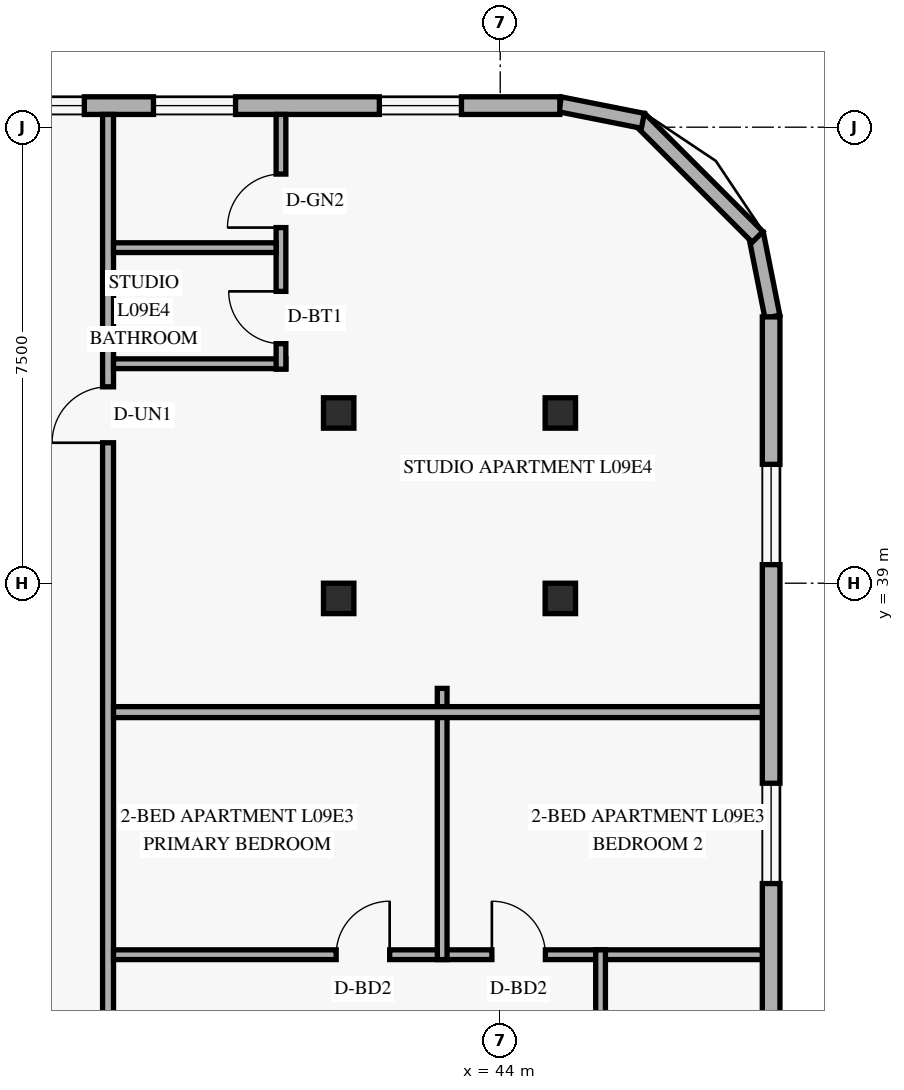
"""IFC4 building model, lengths in metres.
Left out: names, types, materials, properties, quantities, classifications, styles, units other than length and angle.
Written with IfcOpenShell. Run it as: python <this file> out.ifc"""

import sys

from ifc_helpers import new_model, si_unit, direction, frame, frame_2d, origin, origin_2d, place, context, subcontext, project, spatial, rectangle, hollow_rectangle, extrude, element, fill, save


model = new_model("IFC4")
c1 = context("Model", 3, precision=1e-05, world=origin(), true_north=direction((0.0, 1.0)))
c2 = subcontext(c1, "Body", "Model", "MODEL_VIEW")
j1 = project(units=[si_unit("LENGTHUNIT", "METRE"), si_unit("PLANEANGLEUNIT", "RADIAN")], contexts=[c1])
p1 = place(None, origin())
s1 = spatial("IfcSite", under=j1, at=p1, CompositionType="ELEMENT")
p2 = place(p1, origin())
s2 = spatial("IfcBuilding", under=s1, at=p2, CompositionType="ELEMENT")
p3 = place(p2, frame((0.0, 0.0, 38.4)))
s3 = spatial("IfcBuildingStorey", under=s2, at=p3, CompositionType="ELEMENT", Elevation=38.4)
for number, where, z_axis, x_axis in (
    (1, (41.28, 38.75, 0.0), (0.035, 0.0, 0.999), (0.0, 1.0, 0.0)),
    (2, (41.28, 41.8, 0.0), (0.035, 0.0, 0.999), (0.0, 1.0, 0.0)),
):
    element("IfcColumn", number, at=place(p3, frame(where, z_axis=z_axis, x_axis=x_axis)), inside=s3, PredefinedType="COLUMN", context=c2, shape_type="SweptSolid", body=[
        extrude(hollow_rectangle(XDim=0.5, YDim=0.5, WallThickness=0.022, at=origin_2d()), origin(), (0.0, 0.0, 1.0), 3.602),
    ])
for number, where, z_axis, x_axis in (
    (3, (44.884, 38.75, 0.0), (0.058, 0.0, 0.998), (0.0, 1.0, 0.0)),
    (4, (44.884, 41.8, 0.0), (0.058, 0.0, 0.998), (0.0, 1.0, 0.0)),
):
    element("IfcColumn", number, at=place(p3, frame(where, z_axis=z_axis, x_axis=x_axis)), inside=s3, PredefinedType="COLUMN", context=c2, shape_type="SweptSolid", body=[
        extrude(hollow_rectangle(XDim=0.5, YDim=0.5, WallThickness=0.022, at=origin_2d()), origin(), (0.0, 0.0, 1.0), 3.606),
    ])
p4 = place(p3, frame((48.476, 43.384, 0.0), z_axis=(0.0, 0.0, 1.0), x_axis=(-0.19496651342, 0.980809899341, 0.0)))
e5 = element("IfcWall", 5, at=p4, inside=s3, PredefinedType="SOLIDWALL", context=c2, shape_type="SweptSolid", body=[
    extrude(rectangle(XDim=1.389, YDim=0.25, at=frame_2d((0.694, 0.0))), origin(), (0.0, 0.0, 1.0), 3.36),
])
p5 = place(p3, frame((48.232, 44.695, 0.0), z_axis=(0.0, 0.0, 1.0), x_axis=(-0.707106781187, 0.707106781187, 0.0)))
e6 = element("IfcWall", 6, at=p5, inside=s3, PredefinedType="SOLIDWALL", context=c2, shape_type="SweptSolid", body=[
    extrude(rectangle(XDim=2.739, YDim=0.25, at=frame_2d((1.37, 0.0))), origin(), (0.0, 0.0, 1.0), 3.36),
])
p6 = place(p3, frame((46.345, 46.605, 0.0), z_axis=(0.0, 0.0, 1.0), x_axis=(-0.980809899341, 0.19496651342, 0.0)))
e7 = element("IfcWall", 7, at=p6, inside=s3, PredefinedType="SOLIDWALL", context=c2, shape_type="SweptSolid", body=[
    extrude(rectangle(XDim=1.389, YDim=0.25, at=frame_2d((0.694, 0.0))), origin(), (0.0, 0.0, 1.0), 3.36),
])
p7 = place(p3, frame((48.455, 4.62, 0.0), z_axis=(0.0, 0.0, 1.0), x_axis=(0.0, 1.0, 0.0)))
e8 = element("IfcWall", 8, at=p7, inside=s3, PredefinedType="SOLIDWALL", context=c2, shape_type="SweptSolid", body=[
    extrude(rectangle(XDim=38.76, YDim=0.29, at=frame_2d((19.38, 0.0))), origin(), (0.0, 0.0, 1.0), 3.36),
])
p8 = place(p7, frame((2.885, 0.0, 0.85)))
e9 = element("IfcOpeningElement", 9, at=p8, cuts=e8, PredefinedType="OPENING", context=c2, shape_type="SweptSolid", body=[
    extrude(rectangle(XDim=1.65, YDim=1.6, at=frame_2d((0.825, 0.8))), frame((0.0, 0.155, 0.0), z_axis=(0.0, -1.0, 0.0), x_axis=(1.0, 0.0, 0.0)), (0.0, 0.0, 1.0), 0.31),
])
p9 = place(p7, frame((11.215, 0.0, 0.85)))
e10 = element("IfcOpeningElement", 10, at=p9, cuts=e8, PredefinedType="OPENING", context=c2, shape_type="SweptSolid", body=[
    extrude(rectangle(XDim=1.65, YDim=1.6, at=frame_2d((0.825, 0.8))), frame((0.0, 0.155, 0.0), z_axis=(0.0, -1.0, 0.0), x_axis=(1.0, 0.0, 0.0)), (0.0, 0.0, 1.0), 0.31),
])
p10 = place(p7, frame((17.655, 0.0, 0.85)))
e11 = element("IfcOpeningElement", 11, at=p10, cuts=e8, PredefinedType="OPENING", context=c2, shape_type="SweptSolid", body=[
    extrude(rectangle(XDim=1.65, YDim=1.6, at=frame_2d((0.825, 0.8))), frame((0.0, 0.155, 0.0), z_axis=(0.0, -1.0, 0.0), x_axis=(1.0, 0.0, 0.0)), (0.0, 0.0, 1.0), 0.31),
])
p11 = place(p7, frame((23.46, 0.0, 0.85)))
e12 = element("IfcOpeningElement", 12, at=p11, cuts=e8, PredefinedType="OPENING", context=c2, shape_type="SweptSolid", body=[
    extrude(rectangle(XDim=1.65, YDim=1.6, at=frame_2d((0.825, 0.8))), frame((0.0, 0.155, 0.0), z_axis=(0.0, -1.0, 0.0), x_axis=(1.0, 0.0, 0.0)), (0.0, 0.0, 1.0), 0.31),
])
p12 = place(p7, frame((29.44, 0.0, 0.85)))
e13 = element("IfcOpeningElement", 13, at=p12, cuts=e8, PredefinedType="OPENING", context=c2, shape_type="SweptSolid", body=[
    extrude(rectangle(XDim=1.65, YDim=1.6, at=frame_2d((0.825, 0.8))), frame((0.0, 0.155, 0.0), z_axis=(0.0, -1.0, 0.0), x_axis=(1.0, 0.0, 0.0)), (0.0, 0.0, 1.0), 0.31),
])
p13 = place(p7, frame((34.685, 0.0, 0.85)))
e14 = element("IfcOpeningElement", 14, at=p13, cuts=e8, PredefinedType="OPENING", context=c2, shape_type="SweptSolid", body=[
    extrude(rectangle(XDim=1.65, YDim=1.6, at=frame_2d((0.825, 0.8))), frame((0.0, 0.155, 0.0), z_axis=(0.0, -1.0, 0.0), x_axis=(1.0, 0.0, 0.0)), (0.0, 0.0, 1.0), 0.31),
])
p14 = place(p3, frame((44.98, 46.855, 0.0), z_axis=(0.0, 0.0, 1.0), x_axis=(-1.0, 0.0, 0.0)))
e15 = element("IfcWall", 15, at=p14, inside=s3, PredefinedType="SOLIDWALL", context=c2, shape_type="SweptSolid", body=[
    extrude(rectangle(XDim=39.56, YDim=0.29, at=frame_2d((19.78, 0.0))), origin(), (0.0, 0.0, 1.0), 3.36),
])
p15 = place(p14, frame((35.445, 0.0, 0.85)))
e16 = element("IfcOpeningElement", 16, at=p15, cuts=e15, PredefinedType="OPENING", context=c2, shape_type="SweptSolid", body=[
    extrude(rectangle(XDim=1.35, YDim=1.55, at=frame_2d((0.675, 0.775))), frame((0.0, 0.155, 0.0), z_axis=(0.0, -1.0, 0.0), x_axis=(1.0, 0.0, 0.0)), (0.0, 0.0, 1.0), 0.31),
])
p16 = place(p14, frame((31.18, 0.0, 0.85)))
e17 = element("IfcOpeningElement", 17, at=p16, cuts=e15, PredefinedType="OPENING", context=c2, shape_type="SweptSolid", body=[
    extrude(rectangle(XDim=1.2, YDim=1.5, at=frame_2d((0.6, 0.75))), frame((0.0, 0.155, 0.0), z_axis=(0.0, -1.0, 0.0), x_axis=(1.0, 0.0, 0.0)), (0.0, 0.0, 1.0), 0.31),
])
p17 = place(p14, frame((25.834, 0.0, 0.85)))
e18 = element("IfcOpeningElement", 18, at=p17, cuts=e15, PredefinedType="OPENING", context=c2, shape_type="SweptSolid", body=[
    extrude(rectangle(XDim=1.35, YDim=1.55, at=frame_2d((0.675, 0.775))), frame((0.0, 0.155, 0.0), z_axis=(0.0, -1.0, 0.0), x_axis=(1.0, 0.0, 0.0)), (0.0, 0.0, 1.0), 0.31),
])
p18 = place(p14, frame((18.799, 0.0, 0.85)))
e19 = element("IfcOpeningElement", 19, at=p18, cuts=e15, PredefinedType="OPENING", context=c2, shape_type="SweptSolid", body=[
    extrude(rectangle(XDim=1.35, YDim=1.55, at=frame_2d((0.675, 0.775))), frame((0.0, 0.155, 0.0), z_axis=(0.0, -1.0, 0.0), x_axis=(1.0, 0.0, 0.0)), (0.0, 0.0, 1.0), 0.31),
])
p19 = place(p14, frame((12.51, 0.0, 0.85)))
e20 = element("IfcOpeningElement", 20, at=p19, cuts=e15, PredefinedType="OPENING", context=c2, shape_type="SweptSolid", body=[
    extrude(rectangle(XDim=1.35, YDim=1.55, at=frame_2d((0.675, 0.775))), frame((0.0, 0.155, 0.0), z_axis=(0.0, -1.0, 0.0), x_axis=(1.0, 0.0, 0.0)), (0.0, 0.0, 1.0), 0.31),
])
p20 = place(p14, frame((7.82, 0.0, 0.85)))
e21 = element("IfcOpeningElement", 21, at=p20, cuts=e15, PredefinedType="OPENING", context=c2, shape_type="SweptSolid", body=[
    extrude(rectangle(XDim=1.35, YDim=1.55, at=frame_2d((0.675, 0.775))), frame((0.0, 0.155, 0.0), z_axis=(0.0, -1.0, 0.0), x_axis=(1.0, 0.0, 0.0)), (0.0, 0.0, 1.0), 0.31),
])
p21 = place(p14, frame((5.333, 0.0, 0.85)))
e22 = element("IfcOpeningElement", 22, at=p21, cuts=e15, PredefinedType="OPENING", context=c2, shape_type="SweptSolid", body=[
    extrude(rectangle(XDim=1.35, YDim=1.55, at=frame_2d((0.675, 0.775))), frame((0.0, 0.155, 0.0), z_axis=(0.0, -1.0, 0.0), x_axis=(1.0, 0.0, 0.0)), (0.0, 0.0, 1.0), 0.31),
])
p22 = place(p14, frame((1.618, 0.0, 0.85)))
e23 = element("IfcOpeningElement", 23, at=p22, cuts=e15, PredefinedType="OPENING", context=c2, shape_type="SweptSolid", body=[
    extrude(rectangle(XDim=1.35, YDim=1.55, at=frame_2d((0.675, 0.775))), frame((0.0, 0.155, 0.0), z_axis=(0.0, -1.0, 0.0), x_axis=(1.0, 0.0, 0.0)), (0.0, 0.0, 1.0), 0.31),
])
p23 = place(p3, frame((37.55, 1.29, 0.0), z_axis=(0.0, 0.0, 1.0), x_axis=(0.0, 1.0, 0.0)))
e24 = element("IfcWall", 24, at=p23, inside=s3, PredefinedType="STANDARD", context=c2, shape_type="SweptSolid", body=[
    extrude(rectangle(XDim=45.42, YDim=0.18, at=frame_2d((22.71, 0.0))), origin(), (0.0, 0.0, 1.0), 2.649),
])
p24 = place(p23, frame((4.46, 0.0, 0.0)))
e25 = element("IfcOpeningElement", 25, at=p24, cuts=e24, PredefinedType="OPENING", context=c2, shape_type="SweptSolid", body=[
    extrude(rectangle(XDim=0.92, YDim=2.15, at=frame_2d((0.46, 1.075))), frame((0.0, 0.1, 0.0), z_axis=(0.0, -1.0, 0.0), x_axis=(1.0, 0.0, 0.0)), (0.0, 0.0, 1.0), 0.2),
])
p25 = place(p23, frame((15.907, 0.0, 0.0)))
e26 = element("IfcOpeningElement", 26, at=p25, cuts=e24, PredefinedType="OPENING", context=c2, shape_type="SweptSolid", body=[
    extrude(rectangle(XDim=0.92, YDim=2.15, at=frame_2d((0.46, 1.075))), frame((0.0, 0.1, 0.0), z_axis=(0.0, -1.0, 0.0), x_axis=(1.0, 0.0, 0.0)), (0.0, 0.0, 1.0), 0.2),
])
p26 = place(p23, frame((28.23, 0.0, 0.0)))
e27 = element("IfcOpeningElement", 27, at=p26, cuts=e24, PredefinedType="OPENING", context=c2, shape_type="SweptSolid", body=[
    extrude(rectangle(XDim=0.92, YDim=2.15, at=frame_2d((0.46, 1.075))), frame((0.0, 0.1, 0.0), z_axis=(0.0, -1.0, 0.0), x_axis=(1.0, 0.0, 0.0)), (0.0, 0.0, 1.0), 0.2),
])
p27 = place(p23, frame((40.02, 0.0, 0.0)))
e28 = element("IfcOpeningElement", 28, at=p27, cuts=e24, PredefinedType="OPENING", context=c2, shape_type="SweptSolid", body=[
    extrude(rectangle(XDim=0.92, YDim=2.15, at=frame_2d((0.46, 1.075))), frame((0.0, 0.1, 0.0), z_axis=(0.0, -1.0, 0.0), x_axis=(1.0, 0.0, 0.0)), (0.0, 0.0, 1.0), 0.2),
])
p28 = place(p3, frame((37.64, 32.89, 0.0), z_axis=(0.0, 0.0, 1.0), x_axis=(1.0, 0.0, 0.0)))
e29 = element("IfcWall", 29, at=p28, inside=s3, PredefinedType="PARTITIONING", context=c2, shape_type="SweptSolid", body=[
    extrude(rectangle(XDim=10.67, YDim=0.16, at=frame_2d((5.335, 0.0))), origin(), (0.0, 0.0, 1.0), 2.649),
])
p29 = place(p28, frame((3.662, 0.0, 0.0)))
e30 = element("IfcOpeningElement", 30, at=p29, cuts=e29, PredefinedType="OPENING", context=c2, shape_type="SweptSolid", body=[
    extrude(rectangle(XDim=0.88, YDim=2.14, at=frame_2d((0.44, 1.07))), frame((0.0, 0.09, 0.0), z_axis=(0.0, -1.0, 0.0), x_axis=(1.0, 0.0, 0.0)), (0.0, 0.0, 1.0), 0.18),
])
p30 = place(p28, frame((6.222, 0.0, 0.0)))
e31 = element("IfcOpeningElement", 31, at=p30, cuts=e29, PredefinedType="OPENING", context=c2, shape_type="SweptSolid", body=[
    extrude(rectangle(XDim=0.88, YDim=2.14, at=frame_2d((0.44, 1.07))), frame((0.0, 0.09, 0.0), z_axis=(0.0, -1.0, 0.0), x_axis=(1.0, 0.0, 0.0)), (0.0, 0.0, 1.0), 0.18),
])
p31 = place(p3, frame((45.65, 24.56, 0.0), z_axis=(0.0, 0.0, 1.0), x_axis=(0.0, 1.0, 0.0)))
e32 = element("IfcWall", 32, at=p31, inside=s3, PredefinedType="PARTITIONING", context=c2, shape_type="SweptSolid", body=[
    extrude(rectangle(XDim=8.41, YDim=0.16, at=frame_2d((4.205, 0.0))), origin(), (0.0, 0.0, 1.0), 3.36),
])
p32 = place(p31, frame((3.445, 0.0, 0.0)))
e33 = element("IfcOpeningElement", 33, at=p32, cuts=e32, PredefinedType="OPENING", context=c2, shape_type="SweptSolid", body=[
    extrude(rectangle(XDim=0.95, YDim=2.15, at=frame_2d((0.475, 1.075))), frame((0.0, 0.09, 0.0), z_axis=(0.0, -1.0, 0.0), x_axis=(1.0, 0.0, 0.0)), (0.0, 0.0, 1.0), 0.18),
])
p33 = place(p3, frame((43.045, 32.81, 0.0), z_axis=(0.0, 0.0, 1.0), x_axis=(0.0, 1.0, 0.0)))
e34 = element("IfcWall", 34, at=p33, inside=s3, PredefinedType="PARTITIONING", context=c2, shape_type="SweptSolid", body=[
    extrude(rectangle(XDim=4.46, YDim=0.16, at=frame_2d((2.23, 0.0))), origin(), (0.0, 0.0, 1.0), 2.932),
])
p34 = place(p3, frame((37.64, 36.88, 0.0), z_axis=(0.0, 0.0, 1.0), x_axis=(1.0, 0.0, 0.0)))
e35 = element("IfcWall", 35, at=p34, inside=s3, PredefinedType="PARTITIONING", context=c2, shape_type="SweptSolid", body=[
    extrude(rectangle(XDim=10.67, YDim=0.18, at=frame_2d((5.335, 0.0))), origin(), (0.0, 0.0, 1.0), 2.649),
])
p35 = place(p3, frame((37.64, 42.61, 0.0), z_axis=(0.0, 0.0, 1.0), x_axis=(1.0, 0.0, 0.0)))
e36 = element("IfcWall", 36, at=p35, inside=s3, PredefinedType="PLUMBINGWALL", context=c2, shape_type="SweptSolid", body=[
    extrude(rectangle(XDim=2.834, YDim=0.16, at=frame_2d((1.417, 0.0))), origin(), (0.0, 0.0, 1.0), 3.36),
])
p36 = place(p3, frame((40.394, 42.52, 0.0), z_axis=(0.0, 0.0, 1.0), x_axis=(0.0, 1.0, 0.0)))
e37 = element("IfcWall", 37, at=p36, inside=s3, PredefinedType="PLUMBINGWALL", context=c2, shape_type="SweptSolid", body=[
    extrude(rectangle(XDim=4.19, YDim=0.16, at=frame_2d((2.095, 0.0))), origin(), (0.0, 0.0, 1.0), 3.36),
])
p37 = place(p36, frame((0.42, 0.0, 0.0)))
e38 = element("IfcOpeningElement", 38, at=p37, cuts=e37, PredefinedType="OPENING", context=c2, shape_type="SweptSolid", body=[
    extrude(rectangle(XDim=0.86, YDim=2.12, at=frame_2d((0.43, 1.06))), frame((0.0, 0.09, 0.0), z_axis=(0.0, -1.0, 0.0), x_axis=(1.0, 0.0, 0.0)), (0.0, 0.0, 1.0), 0.18),
])
p38 = place(p36, frame((2.329, 0.0, 0.0)))
e39 = element("IfcOpeningElement", 39, at=p38, cuts=e37, PredefinedType="OPENING", context=c2, shape_type="SweptSolid", body=[
    extrude(rectangle(XDim=0.88, YDim=2.12, at=frame_2d((0.44, 1.06))), frame((0.0, 0.09, 0.0), z_axis=(0.0, -1.0, 0.0), x_axis=(1.0, 0.0, 0.0)), (0.0, 0.0, 1.0), 0.18),
])
p39 = place(p3, frame((37.64, 44.519, 0.0), z_axis=(0.0, 0.0, 1.0), x_axis=(1.0, 0.0, 0.0)))
e40 = element("IfcWall", 40, at=p39, inside=s3, PredefinedType="PLUMBINGWALL", context=c2, shape_type="SweptSolid", body=[
    extrude(rectangle(XDim=2.674, YDim=0.16, at=frame_2d((1.337, 0.0))), origin(), (0.0, 0.0, 1.0), 3.36),
])
p40 = place(p12, origin())
e41 = element("IfcWindow", 41, at=p40, inside=s3, PartitioningType="SINGLE_PANEL", PredefinedType="WINDOW", context=c2, shape_type="SweptSolid", body=[
    extrude(rectangle(XDim=1.65, YDim=1.6, at=frame_2d((0.825, 0.8))), frame((0.0, 0.03, 0.0), z_axis=(0.0, -1.0, 0.0), x_axis=(1.0, 0.0, 0.0)), (0.0, 0.0, 1.0), 0.06),
])
fill(e13, e41)
p41 = place(p13, origin())
e42 = element("IfcWindow", 42, at=p41, inside=s3, PartitioningType="SINGLE_PANEL", PredefinedType="WINDOW", context=c2, shape_type="SweptSolid", body=[
    extrude(rectangle(XDim=1.65, YDim=1.6, at=frame_2d((0.825, 0.8))), frame((0.0, 0.03, 0.0), z_axis=(0.0, -1.0, 0.0), x_axis=(1.0, 0.0, 0.0)), (0.0, 0.0, 1.0), 0.06),
])
fill(e14, e42)
p42 = place(p20, origin())
e43 = element("IfcWindow", 43, at=p42, inside=s3, PartitioningType="SINGLE_PANEL", PredefinedType="WINDOW", context=c2, shape_type="SweptSolid", body=[
    extrude(rectangle(XDim=1.35, YDim=1.55, at=frame_2d((0.675, 0.775))), frame((0.0, 0.03, 0.0), z_axis=(0.0, -1.0, 0.0), x_axis=(1.0, 0.0, 0.0)), (0.0, 0.0, 1.0), 0.06),
])
fill(e21, e43)
p43 = place(p21, origin())
e44 = element("IfcWindow", 44, at=p43, inside=s3, PartitioningType="SINGLE_PANEL", PredefinedType="WINDOW", context=c2, shape_type="SweptSolid", body=[
    extrude(rectangle(XDim=1.35, YDim=1.55, at=frame_2d((0.675, 0.775))), frame((0.0, 0.03, 0.0), z_axis=(0.0, -1.0, 0.0), x_axis=(1.0, 0.0, 0.0)), (0.0, 0.0, 1.0), 0.06),
])
fill(e22, e44)
p44 = place(p22, origin())
e45 = element("IfcWindow", 45, at=p44, inside=s3, PartitioningType="SINGLE_PANEL", PredefinedType="WINDOW", context=c2, shape_type="SweptSolid", body=[
    extrude(rectangle(XDim=1.35, YDim=1.55, at=frame_2d((0.675, 0.775))), frame((0.0, 0.03, 0.0), z_axis=(0.0, -1.0, 0.0), x_axis=(1.0, 0.0, 0.0)), (0.0, 0.0, 1.0), 0.06),
])
fill(e23, e45)
p45 = place(p29, origin())
e46 = element("IfcDoor", 46, at=p45, inside=s3, OperationType="SINGLE_SWING_RIGHT", PredefinedType="DOOR", context=c2, shape_type="SweptSolid", body=[
    extrude(rectangle(XDim=0.88, YDim=2.14, at=frame_2d((0.44, 1.07))), frame((0.0, 0.025, 0.0), z_axis=(0.0, -1.0, 0.0), x_axis=(1.0, 0.0, 0.0)), (0.0, 0.0, 1.0), 0.05),
])
fill(e30, e46)
p46 = place(p30, origin())
e47 = element("IfcDoor", 47, at=p46, inside=s3, OperationType="SINGLE_SWING_LEFT", PredefinedType="DOOR", context=c2, shape_type="SweptSolid", body=[
    extrude(rectangle(XDim=0.88, YDim=2.14, at=frame_2d((0.44, 1.07))), frame((0.0, 0.025, 0.0), z_axis=(0.0, -1.0, 0.0), x_axis=(1.0, 0.0, 0.0)), (0.0, 0.0, 1.0), 0.05),
])
fill(e31, e47)
p47 = place(p27, origin())
e48 = element("IfcDoor", 48, at=p47, inside=s3, OperationType="SINGLE_SWING_LEFT", PredefinedType="DOOR", context=c2, shape_type="SweptSolid", body=[
    extrude(rectangle(XDim=0.92, YDim=2.15, at=frame_2d((0.46, 1.075))), frame((0.0, 0.025, 0.0), z_axis=(0.0, -1.0, 0.0), x_axis=(1.0, 0.0, 0.0)), (0.0, 0.0, 1.0), 0.05),
])
fill(e28, e48)
p48 = place(p37, origin())
e49 = element("IfcDoor", 49, at=p48, inside=s3, OperationType="SINGLE_SWING_RIGHT", PredefinedType="DOOR", context=c2, shape_type="SweptSolid", body=[
    extrude(rectangle(XDim=0.86, YDim=2.12, at=frame_2d((0.43, 1.06))), frame((0.0, 0.025, 0.0), z_axis=(0.0, -1.0, 0.0), x_axis=(1.0, 0.0, 0.0)), (0.0, 0.0, 1.0), 0.05),
])
fill(e38, e49)
p49 = place(p38, origin())
e50 = element("IfcDoor", 50, at=p49, inside=s3, OperationType="SINGLE_SWING_LEFT", PredefinedType="DOOR", context=c2, shape_type="SweptSolid", body=[
    extrude(rectangle(XDim=0.88, YDim=2.12, at=frame_2d((0.44, 1.06))), frame((0.0, 0.025, 0.0), z_axis=(0.0, -1.0, 0.0), x_axis=(1.0, 0.0, 0.0)), (0.0, 0.0, 1.0), 0.05),
])
fill(e39, e50)
save(model, sys.argv[1])
